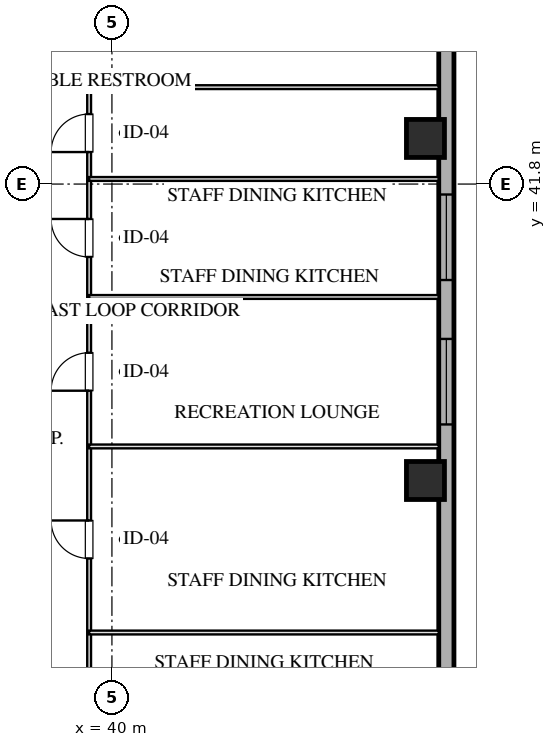
"""IFC4 building model, lengths in metres.
Left out: names, types, materials, properties, quantities, classifications, styles, units other than length and angle.
Written with IfcOpenShell. Run it as: python <this file> out.ifc"""

import sys

from ifc_helpers import new_model, si_unit, direction, frame, frame_2d, origin, origin_2d, place, context, subcontext, project, spatial, rectangle, hollow_rectangle, extrude, element, fill, save


model = new_model("IFC4")
c1 = context("Model", 3, precision=1e-05, world=origin(), true_north=direction((0.0, 1.0)))
c2 = subcontext(c1, "Body", "Model", "MODEL_VIEW")
j1 = project(units=[si_unit("LENGTHUNIT", "METRE"), si_unit("PLANEANGLEUNIT", "RADIAN")], contexts=[c1])
p1 = place(None, origin())
s1 = spatial("IfcSite", under=j1, at=p1, CompositionType="ELEMENT")
p2 = place(p1, origin())
s2 = spatial("IfcBuilding", under=s1, at=p2, CompositionType="ELEMENT")
p3 = place(p2, frame((0.0, 0.0, 127.65)))
s3 = spatial("IfcBuildingStorey", under=s2, at=p3, CompositionType="ELEMENT", Elevation=127.65)
for number, where, z_axis, x_axis in (
    (1, (48.25, 34.0, 0.0), (0.0, 0.0, 1.0), (1.0, 0.0, 0.0)),
    (2, (48.25, 43.0, 0.0), (0.0, 0.0, 1.0), (1.0, 0.0, 0.0)),
):
    element("IfcColumn", number, at=place(p3, frame(where, z_axis=z_axis, x_axis=x_axis)), inside=s3, PredefinedType="COLUMN", context=c2, shape_type="SweptSolid", body=[
        extrude(hollow_rectangle(XDim=1.0, YDim=1.0, WallThickness=0.036, at=origin_2d()), origin(), (0.0, 0.0, 1.0), 3.451),
    ])
p4 = place(p3, frame((48.8, 59.0, 0.0), z_axis=(0.0, 0.0, 1.0), x_axis=(0.0, -1.0, 0.0)))
e3 = element("IfcWall", 3, at=p4, inside=s3, PredefinedType="SOLIDWALL", context=c2, shape_type="SweptSolid", body=[
    extrude(rectangle(XDim=50.0, YDim=0.4, at=frame_2d((25.0, 0.0))), origin(), (0.0, 0.0, 1.0), 2.61),
])
p5 = place(p4, frame((21.275, 0.0, 0.75)))
e4 = element("IfcOpeningElement", 4, at=p5, cuts=e3, PredefinedType="OPENING", context=c2, shape_type="SweptSolid", body=[
    extrude(rectangle(XDim=2.25, YDim=1.46, at=frame_2d((1.125, 0.73))), frame((0.0, 0.21, 0.0), z_axis=(0.0, -1.0, 0.0), x_axis=(1.0, 0.0, 0.0)), (0.0, 0.0, 1.0), 0.42),
])
p6 = place(p4, frame((17.475, 0.0, 0.75)))
e5 = element("IfcOpeningElement", 5, at=p6, cuts=e3, PredefinedType="OPENING", context=c2, shape_type="SweptSolid", body=[
    extrude(rectangle(XDim=2.25, YDim=1.46, at=frame_2d((1.125, 0.73))), frame((0.0, 0.21, 0.0), z_axis=(0.0, -1.0, 0.0), x_axis=(1.0, 0.0, 0.0)), (0.0, 0.0, 1.0), 0.42),
])
p7 = place(p3, frame((39.4, 44.35, 0.0), z_axis=(0.0, 0.0, 1.0), x_axis=(1.0, 0.0, 0.0)))
e6 = element("IfcWall", 6, at=p7, inside=s3, PredefinedType="MOVABLE", context=c2, shape_type="SweptSolid", body=[
    extrude(rectangle(XDim=9.2, YDim=0.1, at=frame_2d((4.6, 0.0))), origin(), (0.0, 0.0, 1.0), 3.175),
])
p8 = place(p3, frame((39.4, 23.65, 0.0), z_axis=(0.0, 0.0, 1.0), x_axis=(0.0, 1.0, 0.0)))
e7 = element("IfcWall", 7, at=p8, inside=s3, PredefinedType="MOVABLE", context=c2, shape_type="SweptSolid", body=[
    extrude(rectangle(XDim=20.7, YDim=0.1, at=frame_2d((10.35, 0.0))), origin(), (0.0, 0.0, 1.0), 3.175),
])
p9 = place(p8, frame((0.775, 0.0, 0.0)))
e8 = element("IfcOpeningElement", 8, at=p9, cuts=e7, PredefinedType="OPENING", context=c2, shape_type="SweptSolid", body=[
    extrude(rectangle(XDim=1.05, YDim=2.05, at=frame_2d((0.525, 1.025))), frame((0.0, 0.06, 0.0), z_axis=(0.0, -1.0, 0.0), x_axis=(1.0, 0.0, 0.0)), (0.0, 0.0, 1.0), 0.12),
])
p10 = place(p8, frame((3.95, 0.0, 0.0)))
e9 = element("IfcOpeningElement", 9, at=p10, cuts=e7, PredefinedType="OPENING", context=c2, shape_type="SweptSolid", body=[
    extrude(rectangle(XDim=1.0, YDim=2.05, at=frame_2d((0.5, 1.025))), frame((0.0, 0.06, 0.0), z_axis=(0.0, -1.0, 0.0), x_axis=(1.0, 0.0, 0.0)), (0.0, 0.0, 1.0), 0.12),
])
p11 = place(p8, frame((8.298, 0.0, 0.0)))
e10 = element("IfcOpeningElement", 10, at=p11, cuts=e7, PredefinedType="OPENING", context=c2, shape_type="SweptSolid", body=[
    extrude(rectangle(XDim=1.0, YDim=2.05, at=frame_2d((0.5, 1.025))), frame((0.0, 0.06, 0.0), z_axis=(0.0, -1.0, 0.0), x_axis=(1.0, 0.0, 0.0)), (0.0, 0.0, 1.0), 0.12),
])
p12 = place(p8, frame((12.712, 0.0, 0.0)))
e11 = element("IfcOpeningElement", 11, at=p12, cuts=e7, PredefinedType="OPENING", context=c2, shape_type="SweptSolid", body=[
    extrude(rectangle(XDim=1.0, YDim=2.05, at=frame_2d((0.5, 1.025))), frame((0.0, 0.06, 0.0), z_axis=(0.0, -1.0, 0.0), x_axis=(1.0, 0.0, 0.0)), (0.0, 0.0, 1.0), 0.12),
])
p13 = place(p8, frame((16.231, 0.0, 0.0)))
e12 = element("IfcOpeningElement", 12, at=p13, cuts=e7, PredefinedType="OPENING", context=c2, shape_type="SweptSolid", body=[
    extrude(rectangle(XDim=1.0, YDim=2.05, at=frame_2d((0.5, 1.025))), frame((0.0, 0.06, 0.0), z_axis=(0.0, -1.0, 0.0), x_axis=(1.0, 0.0, 0.0)), (0.0, 0.0, 1.0), 0.12),
])
p14 = place(p8, frame((18.992, 0.0, 0.0)))
e13 = element("IfcOpeningElement", 13, at=p14, cuts=e7, PredefinedType="OPENING", context=c2, shape_type="SweptSolid", body=[
    extrude(rectangle(XDim=1.0, YDim=2.05, at=frame_2d((0.5, 1.025))), frame((0.0, 0.06, 0.0), z_axis=(0.0, -1.0, 0.0), x_axis=(1.0, 0.0, 0.0)), (0.0, 0.0, 1.0), 0.12),
])
for number, where, z_axis, x_axis in (
    (14, (39.4, 30.0, 0.0), (0.0, 0.0, 1.0), (1.0, 0.0, 0.0)),
    (15, (39.4, 34.896, 0.0), (0.0, 0.0, 1.0), (1.0, 0.0, 0.0)),
    (16, (39.4, 38.829, 0.0), (0.0, 0.0, 1.0), (1.0, 0.0, 0.0)),
    (17, (39.4, 41.934, 0.0), (0.0, 0.0, 1.0), (1.0, 0.0, 0.0)),
):
    element("IfcWall", number, at=place(p3, frame(where, z_axis=z_axis, x_axis=x_axis)), inside=s3, PredefinedType="MOVABLE", context=c2, shape_type="SweptSolid", body=[
        extrude(rectangle(XDim=9.2, YDim=0.1, at=frame_2d((4.6, 0.0))), origin(), (0.0, 0.0, 1.0), 3.175),
    ])
p15 = place(p5, origin())
e18 = element("IfcWindow", 18, at=p15, inside=s3, PartitioningType="TRIPLE_PANEL_VERTICAL", PredefinedType="WINDOW", context=c2, shape_type="SweptSolid", body=[
    extrude(rectangle(XDim=2.25, YDim=1.46, at=frame_2d((1.125, 0.73))), frame((0.0, 0.03, 0.0), z_axis=(0.0, -1.0, 0.0), x_axis=(1.0, 0.0, 0.0)), (0.0, 0.0, 1.0), 0.06),
])
fill(e4, e18)
p16 = place(p6, origin())
e19 = element("IfcWindow", 19, at=p16, inside=s3, PartitioningType="TRIPLE_PANEL_VERTICAL", PredefinedType="WINDOW", context=c2, shape_type="SweptSolid", body=[
    extrude(rectangle(XDim=2.25, YDim=1.46, at=frame_2d((1.125, 0.73))), frame((0.0, 0.03, 0.0), z_axis=(0.0, -1.0, 0.0), x_axis=(1.0, 0.0, 0.0)), (0.0, 0.0, 1.0), 0.06),
])
fill(e5, e19)
p17 = place(p11, origin())
e20 = element("IfcDoor", 20, at=p17, inside=s3, OperationType="SINGLE_SWING_RIGHT", PredefinedType="DOOR", context=c2, shape_type="SweptSolid", body=[
    extrude(rectangle(XDim=1.0, YDim=2.05, at=frame_2d((0.5, 1.025))), frame((0.0, 0.025, 0.0), z_axis=(0.0, -1.0, 0.0), x_axis=(1.0, 0.0, 0.0)), (0.0, 0.0, 1.0), 0.05),
])
fill(e10, e20)
p18 = place(p12, origin())
e21 = element("IfcDoor", 21, at=p18, inside=s3, OperationType="SINGLE_SWING_LEFT", PredefinedType="DOOR", context=c2, shape_type="SweptSolid", body=[
    extrude(rectangle(XDim=1.0, YDim=2.05, at=frame_2d((0.5, 1.025))), frame((0.0, 0.025, 0.0), z_axis=(0.0, -1.0, 0.0), x_axis=(1.0, 0.0, 0.0)), (0.0, 0.0, 1.0), 0.05),
])
fill(e11, e21)
p19 = place(p13, origin())
e22 = element("IfcDoor", 22, at=p19, inside=s3, OperationType="SINGLE_SWING_RIGHT", PredefinedType="DOOR", context=c2, shape_type="SweptSolid", body=[
    extrude(rectangle(XDim=1.0, YDim=2.05, at=frame_2d((0.5, 1.025))), frame((0.0, 0.025, 0.0), z_axis=(0.0, -1.0, 0.0), x_axis=(1.0, 0.0, 0.0)), (0.0, 0.0, 1.0), 0.05),
])
fill(e12, e22)
p20 = place(p14, origin())
e23 = element("IfcDoor", 23, at=p20, inside=s3, OperationType="SINGLE_SWING_LEFT", PredefinedType="DOOR", context=c2, shape_type="SweptSolid", body=[
    extrude(rectangle(XDim=1.0, YDim=2.05, at=frame_2d((0.5, 1.025))), frame((0.0, 0.025, 0.0), z_axis=(0.0, -1.0, 0.0), x_axis=(1.0, 0.0, 0.0)), (0.0, 0.0, 1.0), 0.05),
])
fill(e13, e23)
save(model, sys.argv[1])
